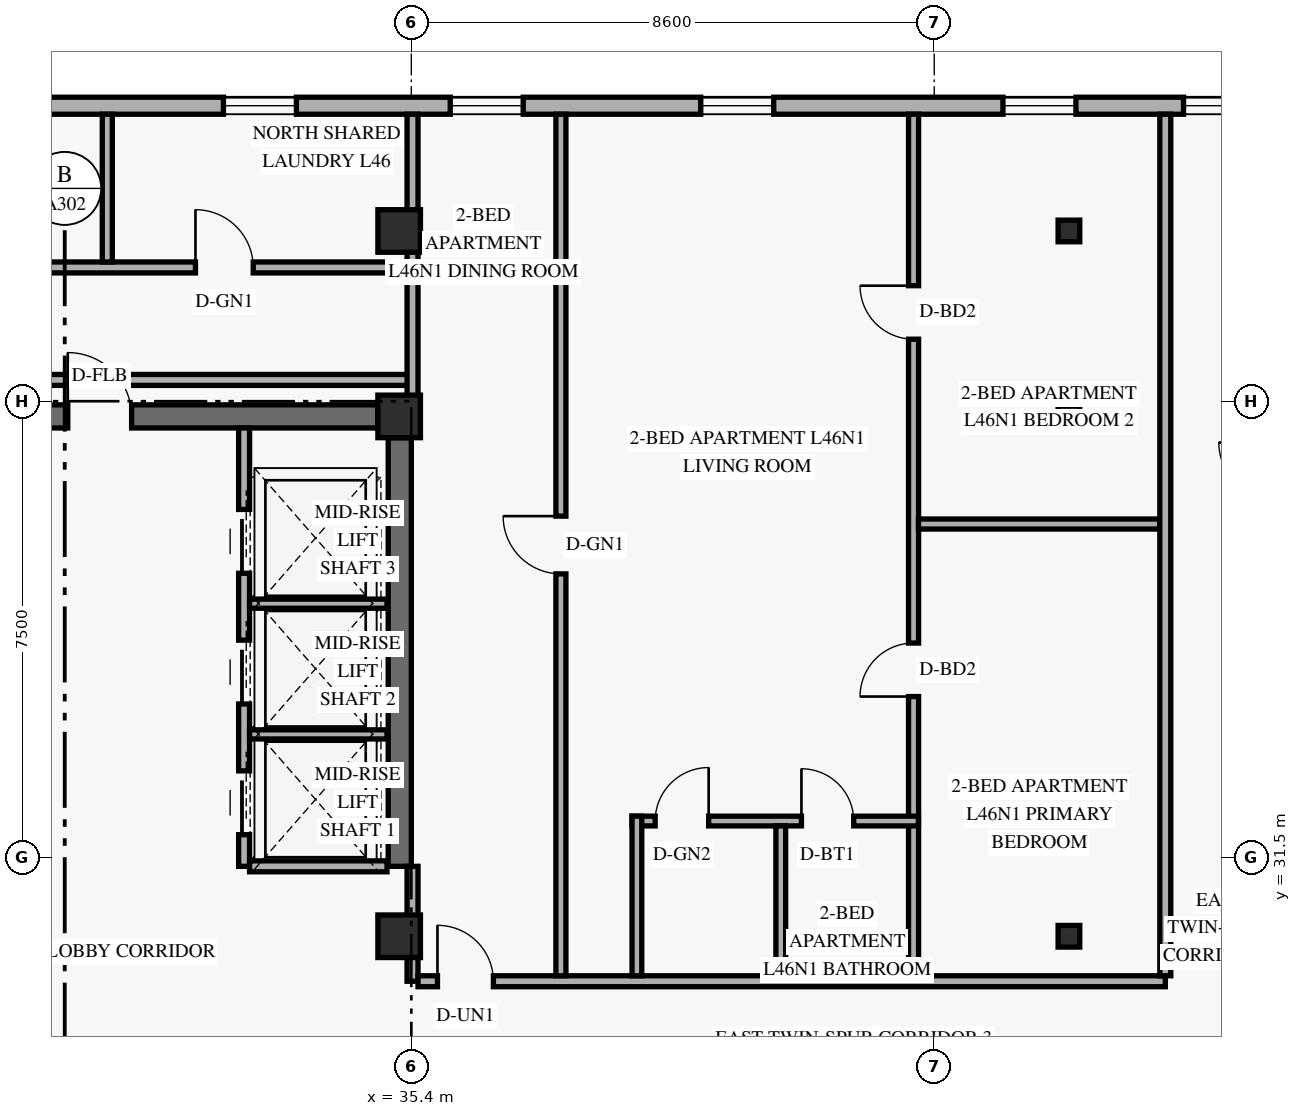
"""IFC4 building model, lengths in metres.
Left out: names, types, materials, properties, quantities, classifications, styles, units other than length and angle.
Written with IfcOpenShell. Run it as: python <this file> out.ifc"""

import sys

from ifc_helpers import new_model, si_unit, direction, frame, frame_2d, origin, origin_2d, place, context, subcontext, project, spatial, rectangle, hollow_rectangle, extrude, element, fill, save


model = new_model("IFC4")
c1 = context("Model", 3, precision=1e-05, world=origin(), true_north=direction((0.0, 1.0)))
c2 = subcontext(c1, "Body", "Model", "MODEL_VIEW")
j1 = project(units=[si_unit("LENGTHUNIT", "METRE"), si_unit("PLANEANGLEUNIT", "RADIAN")], contexts=[c1])
p1 = place(None, origin())
s1 = spatial("IfcSite", under=j1, at=p1, CompositionType="ELEMENT")
p2 = place(p1, origin())
s2 = spatial("IfcBuilding", under=s1, at=p2, CompositionType="ELEMENT")
p3 = place(p2, frame((0.0, 0.0, 177.6)))
s3 = spatial("IfcBuildingStorey", under=s2, at=p3, CompositionType="ELEMENT", Elevation=177.6)
p4 = place(p3, frame((35.21, 31.35, 0.0), z_axis=(0.0, 0.0, 1.0), x_axis=(0.0, 1.0, 0.0)))
e1 = element("IfcWall", 1, at=p4, inside=s3, PredefinedType="SHEAR", context=c2, shape_type="SweptSolid", body=[
    extrude(rectangle(XDim=7.05, YDim=0.38, at=frame_2d((3.525, 0.0))), origin(), (0.0, 0.0, 1.0), 2.748),
])
p5 = place(p3, frame((24.55, 38.75, 0.0), z_axis=(0.0, 0.0, 1.0), x_axis=(1.0, 0.0, 0.0)))
e2 = element("IfcWall", 2, at=p5, inside=s3, PredefinedType="SHEAR", context=c2, shape_type="SweptSolid", body=[
    extrude(rectangle(XDim=10.3, YDim=0.38, at=frame_2d((5.15, 0.0))), origin(), (0.0, 0.0, 1.0), 3.36),
])
p6 = place(p5, frame((5.2, 0.0, 0.0)))
e3 = element("IfcOpeningElement", 3, at=p6, cuts=e2, PredefinedType="OPENING", context=c2, shape_type="SweptSolid", body=[
    extrude(rectangle(XDim=1.05, YDim=2.15, at=frame_2d((0.525, 1.075))), frame((0.0, 0.2, 0.0), z_axis=(0.0, -1.0, 0.0), x_axis=(1.0, 0.0, 0.0)), (0.0, 0.0, 1.0), 0.4),
])
for number, where, z_axis, x_axis in (
    (4, (35.2, 30.2, 0.0), (0.0, 0.0, 1.0), (1.0, 0.0, 0.0)),
    (5, (35.2, 38.75, 0.0), (0.0, 0.0, 1.0), (1.0, 0.0, 0.0)),
    (6, (35.2, 41.8, 0.0), (0.0, 0.0, 1.0), (1.0, 0.0, 0.0)),
):
    element("IfcColumn", number, at=place(p3, frame(where, z_axis=z_axis, x_axis=x_axis)), inside=s3, PredefinedType="COLUMN", context=c2, shape_type="SweptSolid", body=[
        extrude(rectangle(XDim=0.7, YDim=0.7, at=origin_2d()), origin(), (0.0, 0.0, 1.0), 3.6),
    ])
for number, where, z_axis, x_axis in (
    (7, (46.152, 30.2, 0.0), (0.035, 0.0, 0.999), (0.0, 1.0, 0.0)),
    (8, (46.152, 38.75, 0.0), (0.035, 0.0, 0.999), (0.0, 1.0, 0.0)),
    (9, (46.152, 41.8, 0.0), (0.035, 0.0, 0.999), (0.0, 1.0, 0.0)),
):
    element("IfcColumn", number, at=place(p3, frame(where, z_axis=z_axis, x_axis=x_axis)), inside=s3, PredefinedType="COLUMN", context=c2, shape_type="SweptSolid", body=[
        extrude(hollow_rectangle(XDim=0.356, YDim=0.356, WallThickness=0.016, at=origin_2d()), origin(), (0.0, 0.0, 1.0), 3.602),
    ])
p7 = place(p3, frame((54.98, 43.86, 0.0), z_axis=(0.0, 0.0, 1.0), x_axis=(-1.0, 0.0, 0.0)))
e10 = element("IfcWall", 10, at=p7, inside=s3, PredefinedType="SOLIDWALL", context=c2, shape_type="SweptSolid", body=[
    extrude(rectangle(XDim=33.76, YDim=0.28, at=frame_2d((16.88, 0.0))), origin(), (0.0, 0.0, 1.0), 3.36),
])
p8 = place(p7, frame((28.355, 0.0, 0.85)))
e11 = element("IfcOpeningElement", 11, at=p8, cuts=e10, PredefinedType="OPENING", context=c2, shape_type="SweptSolid", body=[
    extrude(rectangle(XDim=1.2, YDim=1.5, at=frame_2d((0.6, 0.75))), frame((0.0, 0.15, 0.0), z_axis=(0.0, -1.0, 0.0), x_axis=(1.0, 0.0, 0.0)), (0.0, 0.0, 1.0), 0.3),
])
p9 = place(p7, frame((21.47, 0.0, 0.85)))
e12 = element("IfcOpeningElement", 12, at=p9, cuts=e10, PredefinedType="OPENING", context=c2, shape_type="SweptSolid", body=[
    extrude(rectangle(XDim=1.2, YDim=1.5, at=frame_2d((0.6, 0.75))), frame((0.0, 0.15, 0.0), z_axis=(0.0, -1.0, 0.0), x_axis=(1.0, 0.0, 0.0)), (0.0, 0.0, 1.0), 0.3),
])
p10 = place(p7, frame((17.74, 0.0, 0.85)))
e13 = element("IfcOpeningElement", 13, at=p10, cuts=e10, PredefinedType="OPENING", context=c2, shape_type="SweptSolid", body=[
    extrude(rectangle(XDim=1.2, YDim=1.5, at=frame_2d((0.6, 0.75))), frame((0.0, 0.15, 0.0), z_axis=(0.0, -1.0, 0.0), x_axis=(1.0, 0.0, 0.0)), (0.0, 0.0, 1.0), 0.3),
])
p11 = place(p7, frame((13.62, 0.0, 0.85)))
e14 = element("IfcOpeningElement", 14, at=p11, cuts=e10, PredefinedType="OPENING", context=c2, shape_type="SweptSolid", body=[
    extrude(rectangle(XDim=1.2, YDim=1.5, at=frame_2d((0.6, 0.75))), frame((0.0, 0.15, 0.0), z_axis=(0.0, -1.0, 0.0), x_axis=(1.0, 0.0, 0.0)), (0.0, 0.0, 1.0), 0.3),
])
p12 = place(p7, frame((8.65, 0.0, 0.85)))
e15 = element("IfcOpeningElement", 15, at=p12, cuts=e10, PredefinedType="OPENING", context=c2, shape_type="SweptSolid", body=[
    extrude(rectangle(XDim=1.2, YDim=1.5, at=frame_2d((0.6, 0.75))), frame((0.0, 0.15, 0.0), z_axis=(0.0, -1.0, 0.0), x_axis=(1.0, 0.0, 0.0)), (0.0, 0.0, 1.0), 0.3),
])
p13 = place(p7, frame((5.68, 0.0, 0.85)))
e16 = element("IfcOpeningElement", 16, at=p13, cuts=e10, PredefinedType="OPENING", context=c2, shape_type="SweptSolid", body=[
    extrude(rectangle(XDim=1.2, YDim=1.5, at=frame_2d((0.6, 0.75))), frame((0.0, 0.15, 0.0), z_axis=(0.0, -1.0, 0.0), x_axis=(1.0, 0.0, 0.0)), (0.0, 0.0, 1.0), 0.3),
])
p14 = place(p7, frame((2.09, 0.0, 0.85)))
e17 = element("IfcOpeningElement", 17, at=p14, cuts=e10, PredefinedType="OPENING", context=c2, shape_type="SweptSolid", body=[
    extrude(rectangle(XDim=1.2, YDim=1.5, at=frame_2d((0.6, 0.75))), frame((0.0, 0.15, 0.0), z_axis=(0.0, -1.0, 0.0), x_axis=(1.0, 0.0, 0.0)), (0.0, 0.0, 1.0), 0.3),
])
p15 = place(p3, frame((32.65, 31.35, 0.0), z_axis=(0.0, 0.0, 1.0), x_axis=(0.0, 1.0, 0.0)))
e18 = element("IfcWall", 18, at=p15, inside=s3, PredefinedType="STANDARD", context=c2, shape_type="SweptSolid", body=[
    extrude(rectangle(XDim=7.21, YDim=0.18, at=frame_2d((3.605, 0.0))), origin(), (0.0, 0.0, 1.0), 3.36),
])
p16 = place(p15, frame((0.52, 0.0, 0.0)))
e19 = element("IfcOpeningElement", 19, at=p16, cuts=e18, PredefinedType="OPENING", context=c2, shape_type="SweptSolid", body=[
    extrude(rectangle(XDim=1.05, YDim=2.2, at=frame_2d((0.525, 1.1))), frame((0.0, 0.1, 0.0), z_axis=(0.0, -1.0, 0.0), x_axis=(1.0, 0.0, 0.0)), (0.0, 0.0, 1.0), 0.2),
])
p17 = place(p15, frame((2.67, 0.0, 0.0)))
e20 = element("IfcOpeningElement", 20, at=p17, cuts=e18, PredefinedType="OPENING", context=c2, shape_type="SweptSolid", body=[
    extrude(rectangle(XDim=1.05, YDim=2.2, at=frame_2d((0.525, 1.1))), frame((0.0, 0.1, 0.0), z_axis=(0.0, -1.0, 0.0), x_axis=(1.0, 0.0, 0.0)), (0.0, 0.0, 1.0), 0.2),
])
p18 = place(p15, frame((4.82, 0.0, 0.0)))
e21 = element("IfcOpeningElement", 21, at=p18, cuts=e18, PredefinedType="OPENING", context=c2, shape_type="SweptSolid", body=[
    extrude(rectangle(XDim=1.05, YDim=2.2, at=frame_2d((0.525, 1.1))), frame((0.0, 0.1, 0.0), z_axis=(0.0, -1.0, 0.0), x_axis=(1.0, 0.0, 0.0)), (0.0, 0.0, 1.0), 0.2),
])
p19 = place(p3, frame((32.74, 31.35, 0.0), z_axis=(0.0, 0.0, 1.0), x_axis=(1.0, 0.0, 0.0)))
e22 = element("IfcWall", 22, at=p19, inside=s3, PredefinedType="STANDARD", context=c2, shape_type="SweptSolid", body=[
    extrude(rectangle(XDim=2.26, YDim=0.18, at=frame_2d((1.13, 0.0))), origin(), (0.0, 0.0, 1.0), 3.36),
])
for number, where, z_axis, x_axis in (
    (23, (32.74, 33.52, 0.0), (0.0, 0.0, 1.0), (1.0, 0.0, 0.0)),
    (24, (32.74, 35.67, 0.0), (0.0, 0.0, 1.0), (1.0, 0.0, 0.0)),
):
    element("IfcWall", number, at=place(p3, frame(where, z_axis=z_axis, x_axis=x_axis)), inside=s3, PredefinedType="STANDARD", context=c2, shape_type="SweptSolid", body=[
        extrude(rectangle(XDim=2.26, YDim=0.15, at=frame_2d((1.13, 0.0))), origin(), (0.0, 0.0, 1.0), 3.36),
    ])
p20 = place(p3, frame((35.42, 29.46, 0.0), z_axis=(0.0, 0.0, 1.0), x_axis=(0.0, 1.0, 0.0)))
e25 = element("IfcWall", 25, at=p20, inside=s3, PredefinedType="STANDARD", context=c2, shape_type="SweptSolid", body=[
    extrude(rectangle(XDim=1.89, YDim=0.18, at=frame_2d((0.945, 0.0))), origin(), (0.0, 0.0, 1.0), 2.73),
])
p21 = place(p3, frame((35.51, 29.46, 0.0), z_axis=(0.0, 0.0, 1.0), x_axis=(1.0, 0.0, 0.0)))
e26 = element("IfcWall", 26, at=p21, inside=s3, PredefinedType="STANDARD", context=c2, shape_type="SweptSolid", body=[
    extrude(rectangle(XDim=12.29, YDim=0.18, at=frame_2d((6.145, 0.0))), origin(), (0.0, 0.0, 1.0), 2.73),
])
p22 = place(p21, frame((0.32, 0.0, 0.0)))
e27 = element("IfcOpeningElement", 27, at=p22, cuts=e26, PredefinedType="OPENING", context=c2, shape_type="SweptSolid", body=[
    extrude(rectangle(XDim=0.92, YDim=2.15, at=frame_2d((0.46, 1.075))), frame((0.0, 0.1, 0.0), z_axis=(0.0, -1.0, 0.0), x_axis=(1.0, 0.0, 0.0)), (0.0, 0.0, 1.0), 0.2),
])
p23 = place(p3, frame((21.74, 41.2, 0.0), z_axis=(0.0, 0.0, 1.0), x_axis=(1.0, 0.0, 0.0)))
e28 = element("IfcWall", 28, at=p23, inside=s3, PredefinedType="STANDARD", context=c2, shape_type="SweptSolid", body=[
    extrude(rectangle(XDim=13.68, YDim=0.18, at=frame_2d((6.84, 0.0))), origin(), (0.0, 0.0, 1.0), 2.73),
])
p24 = place(p23, frame((2.95, 0.0, 0.0)))
e29 = element("IfcOpeningElement", 29, at=p24, cuts=e28, PredefinedType="OPENING", context=c2, shape_type="SweptSolid", body=[
    extrude(rectangle(XDim=0.95, YDim=2.15, at=frame_2d((0.475, 1.075))), frame((0.0, 0.1, 0.0), z_axis=(0.0, -1.0, 0.0), x_axis=(1.0, 0.0, 0.0)), (0.0, 0.0, 1.0), 0.2),
])
p25 = place(p23, frame((10.11, 0.0, 0.0)))
e30 = element("IfcOpeningElement", 30, at=p25, cuts=e28, PredefinedType="OPENING", context=c2, shape_type="SweptSolid", body=[
    extrude(rectangle(XDim=0.95, YDim=2.15, at=frame_2d((0.475, 1.075))), frame((0.0, 0.1, 0.0), z_axis=(0.0, -1.0, 0.0), x_axis=(1.0, 0.0, 0.0)), (0.0, 0.0, 1.0), 0.2),
])
p26 = place(p3, frame((23.85, 39.35, 0.0), z_axis=(0.0, 0.0, 1.0), x_axis=(1.0, 0.0, 0.0)))
e31 = element("IfcWall", 31, at=p26, inside=s3, PredefinedType="STANDARD", context=c2, shape_type="SweptSolid", body=[
    extrude(rectangle(XDim=11.57, YDim=0.18, at=frame_2d((5.785, 0.0))), origin(), (0.0, 0.0, 1.0), 2.73),
])
p27 = place(p3, frame((35.42, 38.75, 0.0), z_axis=(0.0, 0.0, 1.0), x_axis=(0.0, 1.0, 0.0)))
e32 = element("IfcWall", 32, at=p27, inside=s3, PredefinedType="PARTITIONING", context=c2, shape_type="SweptSolid", body=[
    extrude(rectangle(XDim=4.97, YDim=0.18, at=frame_2d((2.485, 0.0))), origin(), (0.0, 0.0, 1.0), 2.73),
])
p28 = place(p3, frame((43.66, 29.55, 0.0), z_axis=(0.0, 0.0, 1.0), x_axis=(0.0, 1.0, 0.0)))
e33 = element("IfcWall", 33, at=p28, inside=s3, PredefinedType="PARTITIONING", context=c2, shape_type="SweptSolid", body=[
    extrude(rectangle(XDim=14.17, YDim=0.165, at=frame_2d((7.085, 0.0))), origin(), (0.0, 0.0, 1.0), 2.73),
])
p29 = place(p28, frame((4.593, 0.0, 0.0)))
e34 = element("IfcOpeningElement", 34, at=p29, cuts=e33, PredefinedType="OPENING", context=c2, shape_type="SweptSolid", body=[
    extrude(rectangle(XDim=0.88, YDim=2.14, at=frame_2d((0.44, 1.07))), frame((0.0, 0.093, 0.0), z_axis=(0.0, -1.0, 0.0), x_axis=(1.0, 0.0, 0.0)), (0.0, 0.0, 1.0), 0.185),
])
p30 = place(p28, frame((10.47, 0.0, 0.0)))
e35 = element("IfcOpeningElement", 35, at=p30, cuts=e33, PredefinedType="OPENING", context=c2, shape_type="SweptSolid", body=[
    extrude(rectangle(XDim=0.88, YDim=2.14, at=frame_2d((0.44, 1.07))), frame((0.0, 0.093, 0.0), z_axis=(0.0, -1.0, 0.0), x_axis=(1.0, 0.0, 0.0)), (0.0, 0.0, 1.0), 0.185),
])
p31 = place(p3, frame((39.03, 32.095, 0.0), z_axis=(0.0, 0.0, 1.0), x_axis=(1.0, 0.0, 0.0)))
e36 = element("IfcWall", 36, at=p31, inside=s3, PredefinedType="PLUMBINGWALL", context=c2, shape_type="SweptSolid", body=[
    extrude(rectangle(XDim=4.71, YDim=0.16, at=frame_2d((2.355, 0.0))), origin(), (0.0, 0.0, 1.0), 3.36),
])
p32 = place(p31, frame((0.38, 0.0, 0.0)))
e37 = element("IfcOpeningElement", 37, at=p32, cuts=e36, PredefinedType="OPENING", context=c2, shape_type="SweptSolid", body=[
    extrude(rectangle(XDim=0.88, YDim=2.12, at=frame_2d((0.44, 1.06))), frame((0.0, 0.09, 0.0), z_axis=(0.0, -1.0, 0.0), x_axis=(1.0, 0.0, 0.0)), (0.0, 0.0, 1.0), 0.18),
])
p33 = place(p31, frame((2.786, 0.0, 0.0)))
e38 = element("IfcOpeningElement", 38, at=p33, cuts=e36, PredefinedType="OPENING", context=c2, shape_type="SweptSolid", body=[
    extrude(rectangle(XDim=0.86, YDim=2.12, at=frame_2d((0.43, 1.06))), frame((0.0, 0.09, 0.0), z_axis=(0.0, -1.0, 0.0), x_axis=(1.0, 0.0, 0.0)), (0.0, 0.0, 1.0), 0.18),
])
p34 = place(p3, frame((39.11, 29.55, 0.0), z_axis=(0.0, 0.0, 1.0), x_axis=(0.0, 1.0, 0.0)))
e39 = element("IfcWall", 39, at=p34, inside=s3, PredefinedType="PLUMBINGWALL", context=c2, shape_type="SweptSolid", body=[
    extrude(rectangle(XDim=2.625, YDim=0.16, at=frame_2d((1.312, 0.0))), origin(), (0.0, 0.0, 1.0), 2.73),
])
p35 = place(p3, frame((41.476, 29.55, 0.0), z_axis=(0.0, 0.0, 1.0), x_axis=(0.0, 1.0, 0.0)))
e40 = element("IfcWall", 40, at=p35, inside=s3, PredefinedType="PLUMBINGWALL", context=c2, shape_type="SweptSolid", body=[
    extrude(rectangle(XDim=2.465, YDim=0.16, at=frame_2d((1.232, 0.0))), origin(), (0.0, 0.0, 1.0), 2.73),
])
p36 = place(p3, frame((37.86, 29.55, 0.0), z_axis=(0.0, 0.0, 1.0), x_axis=(0.0, 1.0, 0.0)))
e41 = element("IfcWall", 41, at=p36, inside=s3, PredefinedType="PARTITIONING", context=c2, shape_type="SweptSolid", body=[
    extrude(rectangle(XDim=14.17, YDim=0.165, at=frame_2d((7.085, 0.0))), origin(), (0.0, 0.0, 1.0), 2.73),
])
p37 = place(p36, frame((6.61, 0.0, 0.0)))
e42 = element("IfcOpeningElement", 42, at=p37, cuts=e41, PredefinedType="OPENING", context=c2, shape_type="SweptSolid", body=[
    extrude(rectangle(XDim=0.95, YDim=2.15, at=frame_2d((0.475, 1.075))), frame((0.0, 0.093, 0.0), z_axis=(0.0, -1.0, 0.0), x_axis=(1.0, 0.0, 0.0)), (0.0, 0.0, 1.0), 0.185),
])
p38 = place(p3, frame((43.74, 36.98, 0.0), z_axis=(0.0, 0.0, 1.0), x_axis=(1.0, 0.0, 0.0)))
e43 = element("IfcWall", 43, at=p38, inside=s3, PredefinedType="PARTITIONING", context=c2, shape_type="SweptSolid", body=[
    extrude(rectangle(XDim=3.97, YDim=0.165, at=frame_2d((1.985, 0.0))), origin(), (0.0, 0.0, 1.0), 2.73),
])
p39 = place(p3, frame((47.8, 29.55, 0.0), z_axis=(0.0, 0.0, 1.0), x_axis=(0.0, 1.0, 0.0)))
e44 = element("IfcWall", 44, at=p39, inside=s3, PredefinedType="STANDARD", context=c2, shape_type="SweptSolid", body=[
    extrude(rectangle(XDim=14.17, YDim=0.18, at=frame_2d((7.085, 0.0))), origin(), (0.0, 0.0, 1.0), 2.73),
])
p40 = place(p3, frame((30.4, 41.29, 0.0), z_axis=(0.0, 0.0, 1.0), x_axis=(0.0, 1.0, 0.0)))
e45 = element("IfcWall", 45, at=p40, inside=s3, PredefinedType="PARTITIONING", context=c2, shape_type="SweptSolid", body=[
    extrude(rectangle(XDim=2.43, YDim=0.165, at=frame_2d((1.215, 0.0))), origin(), (0.0, 0.0, 1.0), 2.879),
])
p41 = place(p9, origin())
e46 = element("IfcWindow", 46, at=p41, inside=s3, PartitioningType="SINGLE_PANEL", PredefinedType="WINDOW", context=c2, shape_type="SweptSolid", body=[
    extrude(rectangle(XDim=1.2, YDim=1.5, at=frame_2d((0.6, 0.75))), frame((0.0, 0.03, 0.0), z_axis=(0.0, -1.0, 0.0), x_axis=(1.0, 0.0, 0.0)), (0.0, 0.0, 1.0), 0.06),
])
fill(e12, e46)
p42 = place(p10, origin())
e47 = element("IfcWindow", 47, at=p42, inside=s3, PartitioningType="SINGLE_PANEL", PredefinedType="WINDOW", context=c2, shape_type="SweptSolid", body=[
    extrude(rectangle(XDim=1.2, YDim=1.5, at=frame_2d((0.6, 0.75))), frame((0.0, 0.03, 0.0), z_axis=(0.0, -1.0, 0.0), x_axis=(1.0, 0.0, 0.0)), (0.0, 0.0, 1.0), 0.06),
])
fill(e13, e47)
p43 = place(p11, origin())
e48 = element("IfcWindow", 48, at=p43, inside=s3, PartitioningType="SINGLE_PANEL", PredefinedType="WINDOW", context=c2, shape_type="SweptSolid", body=[
    extrude(rectangle(XDim=1.2, YDim=1.5, at=frame_2d((0.6, 0.75))), frame((0.0, 0.03, 0.0), z_axis=(0.0, -1.0, 0.0), x_axis=(1.0, 0.0, 0.0)), (0.0, 0.0, 1.0), 0.06),
])
fill(e14, e48)
p44 = place(p12, origin())
e49 = element("IfcWindow", 49, at=p44, inside=s3, PartitioningType="SINGLE_PANEL", PredefinedType="WINDOW", context=c2, shape_type="SweptSolid", body=[
    extrude(rectangle(XDim=1.2, YDim=1.5, at=frame_2d((0.6, 0.75))), frame((0.0, 0.03, 0.0), z_axis=(0.0, -1.0, 0.0), x_axis=(1.0, 0.0, 0.0)), (0.0, 0.0, 1.0), 0.06),
])
fill(e15, e49)
p45 = place(p13, origin())
e50 = element("IfcWindow", 50, at=p45, inside=s3, PartitioningType="SINGLE_PANEL", PredefinedType="WINDOW", context=c2, shape_type="SweptSolid", body=[
    extrude(rectangle(XDim=1.2, YDim=1.5, at=frame_2d((0.6, 0.75))), frame((0.0, 0.03, 0.0), z_axis=(0.0, -1.0, 0.0), x_axis=(1.0, 0.0, 0.0)), (0.0, 0.0, 1.0), 0.06),
])
fill(e16, e50)
p46 = place(p16, origin())
e51 = element("IfcDoor", 51, at=p46, inside=s3, OperationType="SLIDING_TO_LEFT", PredefinedType="DOOR", context=c2, shape_type="SweptSolid", body=[
    extrude(rectangle(XDim=1.05, YDim=2.2, at=frame_2d((0.525, 1.1))), frame((0.0, 0.025, 0.0), z_axis=(0.0, -1.0, 0.0), x_axis=(1.0, 0.0, 0.0)), (0.0, 0.0, 1.0), 0.05),
])
fill(e19, e51)
p47 = place(p17, origin())
e52 = element("IfcDoor", 52, at=p47, inside=s3, OperationType="SLIDING_TO_LEFT", PredefinedType="DOOR", context=c2, shape_type="SweptSolid", body=[
    extrude(rectangle(XDim=1.05, YDim=2.2, at=frame_2d((0.525, 1.1))), frame((0.0, 0.025, 0.0), z_axis=(0.0, -1.0, 0.0), x_axis=(1.0, 0.0, 0.0)), (0.0, 0.0, 1.0), 0.05),
])
fill(e20, e52)
p48 = place(p18, origin())
e53 = element("IfcDoor", 53, at=p48, inside=s3, OperationType="SLIDING_TO_LEFT", PredefinedType="DOOR", context=c2, shape_type="SweptSolid", body=[
    extrude(rectangle(XDim=1.05, YDim=2.2, at=frame_2d((0.525, 1.1))), frame((0.0, 0.025, 0.0), z_axis=(0.0, -1.0, 0.0), x_axis=(1.0, 0.0, 0.0)), (0.0, 0.0, 1.0), 0.05),
])
fill(e21, e53)
p49 = place(p6, frame((1.05, 0.0, 0.0), z_axis=(0.0, 0.0, 1.0), x_axis=(-1.0, 0.0, 0.0)))
e54 = element("IfcDoor", 54, at=p49, inside=s3, OperationType="SINGLE_SWING_RIGHT", PredefinedType="DOOR", context=c2, shape_type="SweptSolid", body=[
    extrude(rectangle(XDim=1.05, YDim=2.15, at=frame_2d((0.525, 1.075))), frame((0.0, 0.025, 0.0), z_axis=(0.0, -1.0, 0.0), x_axis=(1.0, 0.0, 0.0)), (0.0, 0.0, 1.0), 0.05),
])
fill(e3, e54)
p50 = place(p37, origin())
e55 = element("IfcDoor", 55, at=p50, inside=s3, OperationType="SINGLE_SWING_RIGHT", PredefinedType="DOOR", context=c2, shape_type="SweptSolid", body=[
    extrude(rectangle(XDim=0.95, YDim=2.15, at=frame_2d((0.475, 1.075))), frame((0.0, 0.025, 0.0), z_axis=(0.0, -1.0, 0.0), x_axis=(1.0, 0.0, 0.0)), (0.0, 0.0, 1.0), 0.05),
])
fill(e42, e55)
p51 = place(p22, origin())
e56 = element("IfcDoor", 56, at=p51, inside=s3, OperationType="SINGLE_SWING_LEFT", PredefinedType="DOOR", context=c2, shape_type="SweptSolid", body=[
    extrude(rectangle(XDim=0.92, YDim=2.15, at=frame_2d((0.46, 1.075))), frame((0.0, 0.025, 0.0), z_axis=(0.0, -1.0, 0.0), x_axis=(1.0, 0.0, 0.0)), (0.0, 0.0, 1.0), 0.05),
])
fill(e27, e56)
p52 = place(p32, origin())
e57 = element("IfcDoor", 57, at=p52, inside=s3, OperationType="SINGLE_SWING_RIGHT", PredefinedType="DOOR", context=c2, shape_type="SweptSolid", body=[
    extrude(rectangle(XDim=0.88, YDim=2.12, at=frame_2d((0.44, 1.06))), frame((0.0, 0.025, 0.0), z_axis=(0.0, -1.0, 0.0), x_axis=(1.0, 0.0, 0.0)), (0.0, 0.0, 1.0), 0.05),
])
fill(e37, e57)
p53 = place(p33, origin())
e58 = element("IfcDoor", 58, at=p53, inside=s3, OperationType="SINGLE_SWING_LEFT", PredefinedType="DOOR", context=c2, shape_type="SweptSolid", body=[
    extrude(rectangle(XDim=0.86, YDim=2.12, at=frame_2d((0.43, 1.06))), frame((0.0, 0.025, 0.0), z_axis=(0.0, -1.0, 0.0), x_axis=(1.0, 0.0, 0.0)), (0.0, 0.0, 1.0), 0.05),
])
fill(e38, e58)
p54 = place(p29, origin())
e59 = element("IfcDoor", 59, at=p54, inside=s3, OperationType="SINGLE_SWING_LEFT", PredefinedType="DOOR", context=c2, shape_type="SweptSolid", body=[
    extrude(rectangle(XDim=0.88, YDim=2.14, at=frame_2d((0.44, 1.07))), frame((0.0, 0.025, 0.0), z_axis=(0.0, -1.0, 0.0), x_axis=(1.0, 0.0, 0.0)), (0.0, 0.0, 1.0), 0.05),
])
fill(e34, e59)
p55 = place(p30, origin())
e60 = element("IfcDoor", 60, at=p55, inside=s3, OperationType="SINGLE_SWING_RIGHT", PredefinedType="DOOR", context=c2, shape_type="SweptSolid", body=[
    extrude(rectangle(XDim=0.88, YDim=2.14, at=frame_2d((0.44, 1.07))), frame((0.0, 0.025, 0.0), z_axis=(0.0, -1.0, 0.0), x_axis=(1.0, 0.0, 0.0)), (0.0, 0.0, 1.0), 0.05),
])
fill(e35, e60)
p56 = place(p25, origin())
e61 = element("IfcDoor", 61, at=p56, inside=s3, OperationType="SINGLE_SWING_LEFT", PredefinedType="DOOR", context=c2, shape_type="SweptSolid", body=[
    extrude(rectangle(XDim=0.95, YDim=2.15, at=frame_2d((0.475, 1.075))), frame((0.0, 0.025, 0.0), z_axis=(0.0, -1.0, 0.0), x_axis=(1.0, 0.0, 0.0)), (0.0, 0.0, 1.0), 0.05),
])
fill(e30, e61)
save(model, sys.argv[1])
